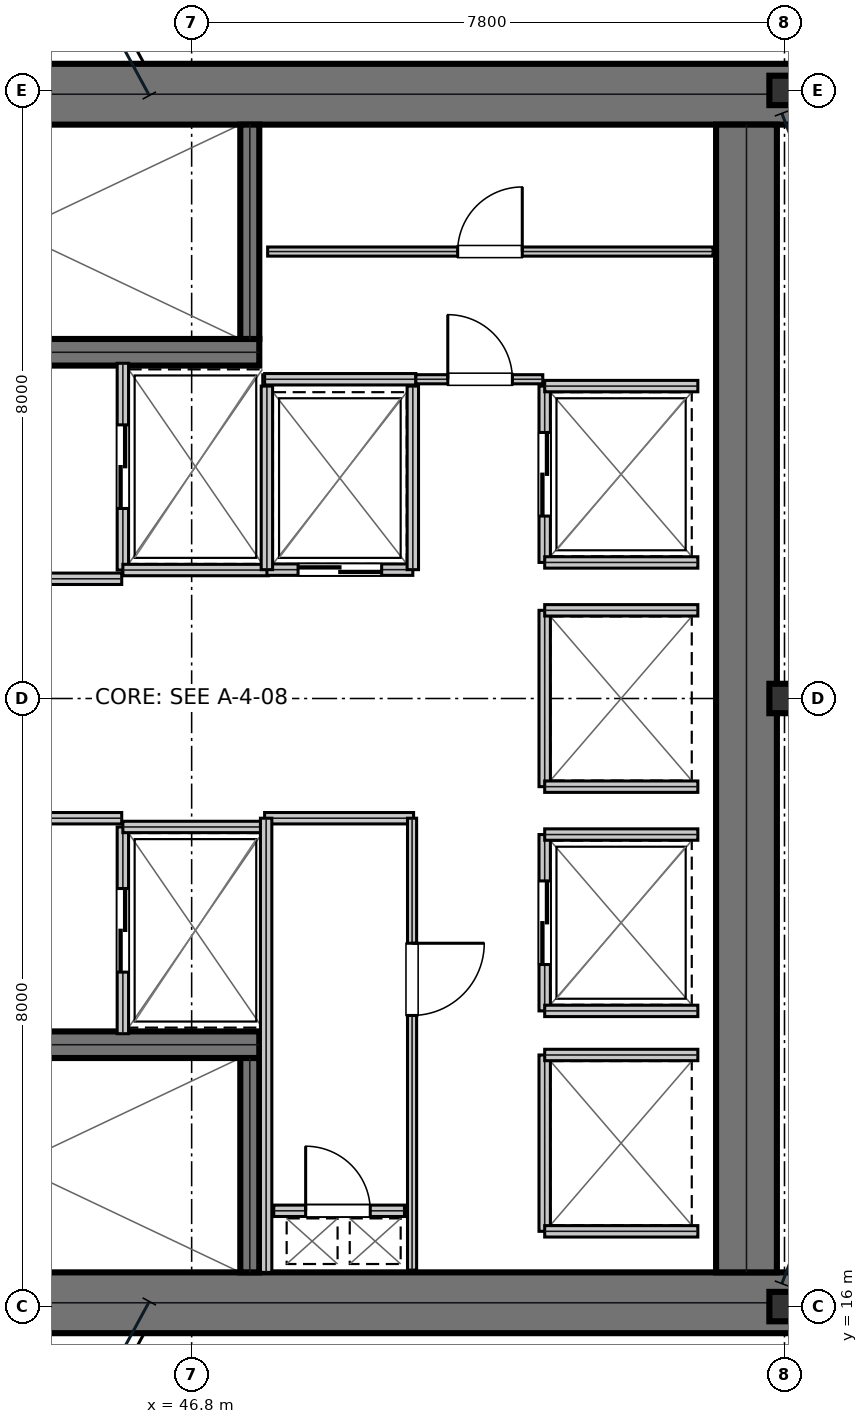
"""IFC4 building model, lengths in metres.
Left out: names, types, materials, properties, quantities, classifications, styles, units other than length and angle.
Written with IfcOpenShell. Run it as: python <this file> out.ifc"""

import sys

from ifc_helpers import new_model, si_unit, direction, frame, frame_2d, origin, origin_2d, place, context, subcontext, project, spatial, rectangle, i_section, extrude, element, fill, save


model = new_model("IFC4")
c1 = context("Model", 3, precision=1e-05, world=origin(), true_north=direction((0.0, 1.0)))
c2 = subcontext(c1, "Body", "Model", "MODEL_VIEW")
j1 = project(units=[si_unit("LENGTHUNIT", "METRE"), si_unit("PLANEANGLEUNIT", "RADIAN")], contexts=[c1])
p1 = place(None, origin())
s1 = spatial("IfcSite", under=j1, at=p1, CompositionType="ELEMENT")
p2 = place(p1, origin())
s2 = spatial("IfcBuilding", under=s1, at=p2, CompositionType="ELEMENT")
p3 = place(p2, frame((0.0, 0.0, 157.35)))
s3 = spatial("IfcBuildingStorey", under=s2, at=p3, CompositionType="ELEMENT", Elevation=157.35)
for number, where, z_axis, x_axis in (
    (1, (38.8, 31.95, 0.0), (0.0, 0.0, 1.0), (1.0, 0.0, 0.0)),
    (2, (38.8, 16.05, 0.0), (0.0, 0.0, 1.0), (1.0, 0.0, 0.0)),
):
    element("IfcWall", number, at=place(p3, frame(where, z_axis=z_axis, x_axis=x_axis)), inside=s3, PredefinedType="SHEAR", context=c2, shape_type="SweptSolid", body=[
        extrude(rectangle(XDim=16.0, YDim=0.8, at=frame_2d((8.0, 0.0))), origin(), (0.0, 0.0, 1.0), 3.81),
    ])
p4 = place(p3, frame((54.1, 16.45, 0.0), z_axis=(0.0, 0.0, 1.0), x_axis=(0.0, 1.0, 0.0)))
e3 = element("IfcWall", 3, at=p4, inside=s3, PredefinedType="SHEAR", context=c2, shape_type="SweptSolid", body=[
    extrude(rectangle(XDim=15.1, YDim=0.8, at=frame_2d((7.55, 0.0))), origin(), (0.0, 0.0, 1.0), 3.81),
])
p5 = place(p3, frame((39.98, 28.555, 0.0), z_axis=(0.0, 0.0, 1.0), x_axis=(1.0, 0.0, 0.0)))
e4 = element("IfcWall", 4, at=p5, inside=s3, PredefinedType="SHEAR", context=c2, shape_type="SweptSolid", body=[
    extrude(rectangle(XDim=7.71, YDim=0.35, at=frame_2d((3.855, 0.0))), origin(), (0.0, 0.0, 1.0), 3.81),
])
p6 = place(p5, frame((0.25, 0.0, 0.0)))
e5 = element("IfcOpeningElement", 5, at=p6, cuts=e4, PredefinedType="OPENING", context=c2, shape_type="SweptSolid", body=[
    extrude(rectangle(XDim=1.1, YDim=2.15, at=frame_2d((0.55, 1.075))), frame((0.0, 0.185, 0.0), z_axis=(0.0, -1.0, 0.0), x_axis=(1.0, 0.0, 0.0)), (0.0, 0.0, 1.0), 0.37),
])
p7 = place(p3, frame((39.98, 19.445, 0.0), z_axis=(0.0, 0.0, 1.0), x_axis=(1.0, 0.0, 0.0)))
e6 = element("IfcWall", 6, at=p7, inside=s3, PredefinedType="SHEAR", context=c2, shape_type="SweptSolid", body=[
    extrude(rectangle(XDim=7.71, YDim=0.35, at=frame_2d((3.855, 0.0))), origin(), (0.0, 0.0, 1.0), 3.81),
])
p8 = place(p7, frame((0.25, 0.0, 0.0)))
e7 = element("IfcOpeningElement", 7, at=p8, cuts=e6, PredefinedType="OPENING", context=c2, shape_type="SweptSolid", body=[
    extrude(rectangle(XDim=1.1, YDim=2.15, at=frame_2d((0.55, 1.075))), frame((0.0, 0.185, 0.0), z_axis=(0.0, -1.0, 0.0), x_axis=(1.0, 0.0, 0.0)), (0.0, 0.0, 1.0), 0.37),
])
for number, where, z_axis, x_axis in (
    (8, (47.565, 28.73, 0.0), (0.0, 0.0, 1.0), (0.0, 1.0, 0.0)),
    (9, (47.565, 16.45, 0.0), (0.0, 0.0, 1.0), (0.0, 1.0, 0.0)),
):
    element("IfcWall", number, at=place(p3, frame(where, z_axis=z_axis, x_axis=x_axis)), inside=s3, PredefinedType="SHEAR", context=c2, shape_type="SweptSolid", body=[
        extrude(rectangle(XDim=2.82, YDim=0.25, at=frame_2d((1.41, 0.0))), origin(), (0.0, 0.0, 1.0), 3.81),
    ])
for number, where, z_axis, x_axis in (
    (10, (54.6, 16.0, 0.0), (0.0, 0.0, 1.0), (1.0, 0.0, 0.0)),
    (11, (54.6, 24.0, 0.0), (0.0, 0.0, 1.0), (1.0, 0.0, 0.0)),
    (12, (54.6, 32.0, 0.0), (0.0, 0.0, 1.0), (1.0, 0.0, 0.0)),
):
    element("IfcColumn", number, at=place(p3, frame(where, z_axis=z_axis, x_axis=x_axis)), inside=s3, PredefinedType="COLUMN", context=c2, shape_type="SweptSolid", body=[
        extrude(i_section(OverallWidth=0.398, OverallDepth=0.387, WebThickness=0.021, FlangeThickness=0.033, at=origin_2d()), origin(), (0.0, 0.0, 1.0), 4.044),
    ])
p9 = place(p3, frame((39.98, 25.575, 0.0), z_axis=(0.0, 0.0, 1.0), x_axis=(1.0, 0.0, 0.0)))
e13 = element("IfcWall", 13, at=p9, inside=s3, PredefinedType="PARTITIONING", context=c2, shape_type="SweptSolid", body=[
    extrude(rectangle(XDim=5.9, YDim=0.15, at=frame_2d((2.95, 0.0))), origin(), (0.0, 0.0, 1.0), 3.81),
])
p10 = place(p9, frame((2.35, 0.0, 0.0)))
e14 = element("IfcOpeningElement", 14, at=p10, cuts=e13, PredefinedType="OPENING", context=c2, shape_type="SweptSolid", body=[
    extrude(rectangle(XDim=1.05, YDim=2.15, at=frame_2d((0.525, 1.075))), frame((0.0, 0.085, 0.0), z_axis=(0.0, -1.0, 0.0), x_axis=(1.0, 0.0, 0.0)), (0.0, 0.0, 1.0), 0.17),
])
p11 = place(p3, frame((39.98, 22.425, 0.0), z_axis=(0.0, 0.0, 1.0), x_axis=(1.0, 0.0, 0.0)))
e15 = element("IfcWall", 15, at=p11, inside=s3, PredefinedType="PARTITIONING", context=c2, shape_type="SweptSolid", body=[
    extrude(rectangle(XDim=5.9, YDim=0.15, at=frame_2d((2.95, 0.0))), origin(), (0.0, 0.0, 1.0), 3.81),
])
p12 = place(p11, frame((2.35, 0.0, 0.0)))
e16 = element("IfcOpeningElement", 16, at=p12, cuts=e15, PredefinedType="OPENING", context=c2, shape_type="SweptSolid", body=[
    extrude(rectangle(XDim=1.05, YDim=2.15, at=frame_2d((0.525, 1.075))), frame((0.0, 0.085, 0.0), z_axis=(0.0, -1.0, 0.0), x_axis=(1.0, 0.0, 0.0)), (0.0, 0.0, 1.0), 0.17),
])
p13 = place(p3, frame((45.895, 25.69, 0.0), z_axis=(0.0, 0.0, 1.0), x_axis=(0.0, 1.0, 0.0)))
e17 = element("IfcWall", 17, at=p13, inside=s3, PredefinedType="PARTITIONING", context=c2, shape_type="SweptSolid", body=[
    extrude(rectangle(XDim=2.72, YDim=0.15, at=frame_2d((1.36, 0.0))), origin(), (0.0, 0.0, 1.0), 3.81),
])
p14 = place(p13, frame((0.81, 0.0, 0.0)))
e18 = element("IfcOpeningElement", 18, at=p14, cuts=e17, PredefinedType="OPENING", context=c2, shape_type="SweptSolid", body=[
    extrude(rectangle(XDim=1.1, YDim=2.15, at=frame_2d((0.55, 1.075))), frame((0.0, 0.085, 0.0), z_axis=(0.0, -1.0, 0.0), x_axis=(1.0, 0.0, 0.0)), (0.0, 0.0, 1.0), 0.17),
])
p15 = place(p3, frame((45.895, 25.69, 0.0), z_axis=(0.0, 0.0, 1.0), x_axis=(1.0, 0.0, 0.0)))
e19 = element("IfcWall", 19, at=p15, inside=s3, PredefinedType="PARTITIONING", context=c2, shape_type="SweptSolid", body=[
    extrude(rectangle(XDim=1.915, YDim=0.15, at=frame_2d((0.958, 0.0))), origin(), (0.0, 0.0, 1.0), 3.81),
])
p16 = place(p3, frame((45.895, 19.59, 0.0), z_axis=(0.0, 0.0, 1.0), x_axis=(0.0, 1.0, 0.0)))
e20 = element("IfcWall", 20, at=p16, inside=s3, PredefinedType="PARTITIONING", context=c2, shape_type="SweptSolid", body=[
    extrude(rectangle(XDim=2.72, YDim=0.15, at=frame_2d((1.36, 0.0))), origin(), (0.0, 0.0, 1.0), 3.81),
])
p17 = place(p16, frame((0.81, 0.0, 0.0)))
e21 = element("IfcOpeningElement", 21, at=p17, cuts=e20, PredefinedType="OPENING", context=c2, shape_type="SweptSolid", body=[
    extrude(rectangle(XDim=1.1, YDim=2.15, at=frame_2d((0.55, 1.075))), frame((0.0, 0.085, 0.0), z_axis=(0.0, -1.0, 0.0), x_axis=(1.0, 0.0, 0.0)), (0.0, 0.0, 1.0), 0.17),
])
p18 = place(p3, frame((45.895, 22.31, 0.0), z_axis=(0.0, 0.0, 1.0), x_axis=(1.0, 0.0, 0.0)))
e22 = element("IfcWall", 22, at=p18, inside=s3, PredefinedType="PARTITIONING", context=c2, shape_type="SweptSolid", body=[
    extrude(rectangle(XDim=1.915, YDim=0.15, at=frame_2d((0.958, 0.0))), origin(), (0.0, 0.0, 1.0), 3.81),
])
p19 = place(p3, frame((47.79, 25.695, 0.0), z_axis=(0.0, 0.0, 1.0), x_axis=(1.0, 0.0, 0.0)))
e23 = element("IfcWall", 23, at=p19, inside=s3, PredefinedType="PARTITIONING", context=c2, shape_type="SweptSolid", body=[
    extrude(rectangle(XDim=1.92, YDim=0.15, at=frame_2d((0.96, 0.0))), origin(), (0.0, 0.0, 1.0), 3.81),
])
p20 = place(p19, frame((0.41, 0.0, 0.0)))
e24 = element("IfcOpeningElement", 24, at=p20, cuts=e23, PredefinedType="OPENING", context=c2, shape_type="SweptSolid", body=[
    extrude(rectangle(XDim=1.1, YDim=2.15, at=frame_2d((0.55, 1.075))), frame((0.0, 0.085, 0.0), z_axis=(0.0, -1.0, 0.0), x_axis=(1.0, 0.0, 0.0)), (0.0, 0.0, 1.0), 0.17),
])
for number, where, z_axis, x_axis in (
    (25, (47.79, 25.695, 0.0), (0.0, 0.0, 1.0), (0.0, 1.0, 0.0)),
    (26, (49.71, 25.695, 0.0), (0.0, 0.0, 1.0), (0.0, 1.0, 0.0)),
):
    element("IfcWall", number, at=place(p3, frame(where, z_axis=z_axis, x_axis=x_axis)), inside=s3, PredefinedType="PARTITIONING", context=c2, shape_type="SweptSolid", body=[
        extrude(rectangle(XDim=2.415, YDim=0.15, at=frame_2d((1.208, 0.0))), origin(), (0.0, 0.0, 1.0), 3.81),
    ])
p21 = place(p3, frame((51.445, 25.79, 0.0), z_axis=(0.0, 0.0, 1.0), x_axis=(0.0, 1.0, 0.0)))
e27 = element("IfcWall", 27, at=p21, inside=s3, PredefinedType="PARTITIONING", context=c2, shape_type="SweptSolid", body=[
    extrude(rectangle(XDim=2.32, YDim=0.15, at=frame_2d((1.16, 0.0))), origin(), (0.0, 0.0, 1.0), 3.81),
])
p22 = place(p21, frame((0.61, 0.0, 0.0)))
e28 = element("IfcOpeningElement", 28, at=p22, cuts=e27, PredefinedType="OPENING", context=c2, shape_type="SweptSolid", body=[
    extrude(rectangle(XDim=1.1, YDim=2.15, at=frame_2d((0.55, 1.075))), frame((0.0, 0.085, 0.0), z_axis=(0.0, -1.0, 0.0), x_axis=(1.0, 0.0, 0.0)), (0.0, 0.0, 1.0), 0.17),
])
for number, where, z_axis, x_axis in (
    (29, (51.445, 25.79, 0.0), (0.0, 0.0, 1.0), (1.0, 0.0, 0.0)),
    (30, (51.445, 28.11, 0.0), (0.0, 0.0, 1.0), (1.0, 0.0, 0.0)),
):
    element("IfcWall", number, at=place(p3, frame(where, z_axis=z_axis, x_axis=x_axis)), inside=s3, PredefinedType="PARTITIONING", context=c2, shape_type="SweptSolid", body=[
        extrude(rectangle(XDim=2.015, YDim=0.15, at=frame_2d((1.007, 0.0))), origin(), (0.0, 0.0, 1.0), 3.81),
    ])
p23 = place(p3, frame((51.445, 19.89, 0.0), z_axis=(0.0, 0.0, 1.0), x_axis=(0.0, 1.0, 0.0)))
e31 = element("IfcWall", 31, at=p23, inside=s3, PredefinedType="PARTITIONING", context=c2, shape_type="SweptSolid", body=[
    extrude(rectangle(XDim=2.32, YDim=0.15, at=frame_2d((1.16, 0.0))), origin(), (0.0, 0.0, 1.0), 3.81),
])
p24 = place(p23, frame((0.61, 0.0, 0.0)))
e32 = element("IfcOpeningElement", 32, at=p24, cuts=e31, PredefinedType="OPENING", context=c2, shape_type="SweptSolid", body=[
    extrude(rectangle(XDim=1.1, YDim=2.15, at=frame_2d((0.55, 1.075))), frame((0.0, 0.085, 0.0), z_axis=(0.0, -1.0, 0.0), x_axis=(1.0, 0.0, 0.0)), (0.0, 0.0, 1.0), 0.17),
])
for number, where, z_axis, x_axis in (
    (33, (51.445, 19.89, 0.0), (0.0, 0.0, 1.0), (1.0, 0.0, 0.0)),
    (34, (51.445, 22.21, 0.0), (0.0, 0.0, 1.0), (1.0, 0.0, 0.0)),
):
    element("IfcWall", number, at=place(p3, frame(where, z_axis=z_axis, x_axis=x_axis)), inside=s3, PredefinedType="PARTITIONING", context=c2, shape_type="SweptSolid", body=[
        extrude(rectangle(XDim=2.015, YDim=0.15, at=frame_2d((1.007, 0.0))), origin(), (0.0, 0.0, 1.0), 3.81),
    ])
p25 = place(p3, frame((51.445, 22.84, 0.0), z_axis=(0.0, 0.0, 1.0), x_axis=(0.0, 1.0, 0.0)))
e35 = element("IfcWall", 35, at=p25, inside=s3, PredefinedType="PARTITIONING", context=c2, shape_type="SweptSolid", body=[
    extrude(rectangle(XDim=2.32, YDim=0.15, at=frame_2d((1.16, 0.0))), origin(), (0.0, 0.0, 1.0), 3.81),
])
for number, where, z_axis, x_axis in (
    (36, (51.445, 22.84, 0.0), (0.0, 0.0, 1.0), (1.0, 0.0, 0.0)),
    (37, (51.445, 25.16, 0.0), (0.0, 0.0, 1.0), (1.0, 0.0, 0.0)),
):
    element("IfcWall", number, at=place(p3, frame(where, z_axis=z_axis, x_axis=x_axis)), inside=s3, PredefinedType="PARTITIONING", context=c2, shape_type="SweptSolid", body=[
        extrude(rectangle(XDim=2.015, YDim=0.15, at=frame_2d((1.007, 0.0))), origin(), (0.0, 0.0, 1.0), 3.81),
    ])
p26 = place(p3, frame((51.445, 16.99, 0.0), z_axis=(0.0, 0.0, 1.0), x_axis=(0.0, 1.0, 0.0)))
e38 = element("IfcWall", 38, at=p26, inside=s3, PredefinedType="PARTITIONING", context=c2, shape_type="SweptSolid", body=[
    extrude(rectangle(XDim=2.32, YDim=0.15, at=frame_2d((1.16, 0.0))), origin(), (0.0, 0.0, 1.0), 3.81),
])
for number, where, z_axis, x_axis in (
    (39, (51.445, 16.99, 0.0), (0.0, 0.0, 1.0), (1.0, 0.0, 0.0)),
    (40, (51.445, 19.31, 0.0), (0.0, 0.0, 1.0), (1.0, 0.0, 0.0)),
):
    element("IfcWall", number, at=place(p3, frame(where, z_axis=z_axis, x_axis=x_axis)), inside=s3, PredefinedType="PARTITIONING", context=c2, shape_type="SweptSolid", body=[
        extrude(rectangle(XDim=2.015, YDim=0.15, at=frame_2d((1.007, 0.0))), origin(), (0.0, 0.0, 1.0), 3.81),
    ])
p27 = place(p3, frame((47.88, 17.26, 0.0), z_axis=(0.0, 0.0, 1.0), x_axis=(1.0, 0.0, 0.0)))
e41 = element("IfcWall", 41, at=p27, inside=s3, PredefinedType="PARTITIONING", context=c2, shape_type="SweptSolid", body=[
    extrude(rectangle(XDim=1.72, YDim=0.15, at=frame_2d((0.86, 0.0))), origin(), (0.0, 0.0, 1.0), 3.81),
])
p28 = place(p27, frame((0.42, 0.0, 0.0)))
e42 = element("IfcOpeningElement", 42, at=p28, cuts=e41, PredefinedType="OPENING", context=c2, shape_type="SweptSolid", body=[
    extrude(rectangle(XDim=0.85, YDim=2.15, at=frame_2d((0.425, 1.075))), frame((0.0, 0.085, 0.0), z_axis=(0.0, -1.0, 0.0), x_axis=(1.0, 0.0, 0.0)), (0.0, 0.0, 1.0), 0.17),
])
p29 = place(p3, frame((47.76, 22.425, 0.0), z_axis=(0.0, 0.0, 1.0), x_axis=(1.0, 0.0, 0.0)))
e43 = element("IfcWall", 43, at=p29, inside=s3, PredefinedType="PARTITIONING", context=c2, shape_type="SweptSolid", body=[
    extrude(rectangle(XDim=1.96, YDim=0.15, at=frame_2d((0.98, 0.0))), origin(), (0.0, 0.0, 1.0), 3.81),
])
p30 = place(p3, frame((47.78, 16.45, 0.0), z_axis=(0.0, 0.0, 1.0), x_axis=(0.0, 1.0, 0.0)))
e44 = element("IfcWall", 44, at=p30, inside=s3, PredefinedType="PARTITIONING", context=c2, shape_type="SweptSolid", body=[
    extrude(rectangle(XDim=5.975, YDim=0.15, at=frame_2d((2.988, 0.0))), origin(), (0.0, 0.0, 1.0), 3.81),
])
p31 = place(p3, frame((49.7, 16.48, 0.0), z_axis=(0.0, 0.0, 1.0), x_axis=(0.0, 1.0, 0.0)))
e45 = element("IfcWall", 45, at=p31, inside=s3, PredefinedType="PARTITIONING", context=c2, shape_type="SweptSolid", body=[
    extrude(rectangle(XDim=5.945, YDim=0.12, at=frame_2d((2.973, 0.0))), origin(), (0.0, 0.0, 1.0), 3.81),
])
p32 = place(p31, frame((3.35, 0.0, 0.0)))
e46 = element("IfcOpeningElement", 46, at=p32, cuts=e45, PredefinedType="OPENING", context=c2, shape_type="SweptSolid", body=[
    extrude(rectangle(XDim=0.95, YDim=2.15, at=frame_2d((0.475, 1.075))), frame((0.0, 0.07, 0.0), z_axis=(0.0, -1.0, 0.0), x_axis=(1.0, 0.0, 0.0)), (0.0, 0.0, 1.0), 0.14),
])
p33 = place(p3, frame((47.76, 28.2, 0.0), z_axis=(0.0, 0.0, 1.0), x_axis=(1.0, 0.0, 0.0)))
e47 = element("IfcWall", 47, at=p33, inside=s3, PredefinedType="PARTITIONING", context=c2, shape_type="SweptSolid", body=[
    extrude(rectangle(XDim=1.99, YDim=0.15, at=frame_2d((0.995, 0.0))), origin(), (0.0, 0.0, 1.0), 3.81),
])
p34 = place(p3, frame((49.75, 28.2, 0.0), z_axis=(0.0, 0.0, 1.0), x_axis=(1.0, 0.0, 0.0)))
e48 = element("IfcWall", 48, at=p34, inside=s3, PredefinedType="PARTITIONING", context=c2, shape_type="SweptSolid", body=[
    extrude(rectangle(XDim=1.67, YDim=0.12, at=frame_2d((0.835, 0.0))), origin(), (0.0, 0.0, 1.0), 3.81),
])
p35 = place(p34, frame((0.42, 0.0, 0.0)))
e49 = element("IfcOpeningElement", 49, at=p35, cuts=e48, PredefinedType="OPENING", context=c2, shape_type="SweptSolid", body=[
    extrude(rectangle(XDim=0.85, YDim=2.15, at=frame_2d((0.425, 1.075))), frame((0.0, 0.07, 0.0), z_axis=(0.0, -1.0, 0.0), x_axis=(1.0, 0.0, 0.0)), (0.0, 0.0, 1.0), 0.14),
])
p36 = place(p3, frame((47.8, 29.88, 0.0), z_axis=(0.0, 0.0, 1.0), x_axis=(1.0, 0.0, 0.0)))
e50 = element("IfcWall", 50, at=p36, inside=s3, PredefinedType="PARTITIONING", context=c2, shape_type="SweptSolid", body=[
    extrude(rectangle(XDim=5.86, YDim=0.12, at=frame_2d((2.93, 0.0))), origin(), (0.0, 0.0, 1.0), 3.81),
])
p37 = place(p36, frame((2.5, 0.0, 0.0)))
e51 = element("IfcOpeningElement", 51, at=p37, cuts=e50, PredefinedType="OPENING", context=c2, shape_type="SweptSolid", body=[
    extrude(rectangle(XDim=0.85, YDim=2.15, at=frame_2d((0.425, 1.075))), frame((0.0, 0.07, 0.0), z_axis=(0.0, -1.0, 0.0), x_axis=(1.0, 0.0, 0.0)), (0.0, 0.0, 1.0), 0.14),
])
p38 = place(p14, frame((1.1, 0.0, 0.0), z_axis=(0.0, 0.0, 1.0), x_axis=(-1.0, 0.0, 0.0)))
e52 = element("IfcDoor", 52, at=p38, inside=s3, OperationType="DOUBLE_DOOR_SLIDING", PredefinedType="DOOR", context=c2, shape_type="SweptSolid", body=[
    extrude(rectangle(XDim=1.1, YDim=2.15, at=frame_2d((0.55, 1.075))), frame((0.0, 0.025, 0.0), z_axis=(0.0, -1.0, 0.0), x_axis=(1.0, 0.0, 0.0)), (0.0, 0.0, 1.0), 0.05),
])
fill(e18, e52)
p39 = place(p17, frame((1.1, 0.0, 0.0), z_axis=(0.0, 0.0, 1.0), x_axis=(-1.0, 0.0, 0.0)))
e53 = element("IfcDoor", 53, at=p39, inside=s3, OperationType="DOUBLE_DOOR_SLIDING", PredefinedType="DOOR", context=c2, shape_type="SweptSolid", body=[
    extrude(rectangle(XDim=1.1, YDim=2.15, at=frame_2d((0.55, 1.075))), frame((0.0, 0.025, 0.0), z_axis=(0.0, -1.0, 0.0), x_axis=(1.0, 0.0, 0.0)), (0.0, 0.0, 1.0), 0.05),
])
fill(e21, e53)
p40 = place(p20, frame((1.1, 0.0, 0.0), z_axis=(0.0, 0.0, 1.0), x_axis=(-1.0, 0.0, 0.0)))
e54 = element("IfcDoor", 54, at=p40, inside=s3, OperationType="DOUBLE_DOOR_SLIDING", PredefinedType="DOOR", context=c2, shape_type="SweptSolid", body=[
    extrude(rectangle(XDim=1.1, YDim=2.15, at=frame_2d((0.55, 1.075))), frame((0.0, 0.025, 0.0), z_axis=(0.0, -1.0, 0.0), x_axis=(1.0, 0.0, 0.0)), (0.0, 0.0, 1.0), 0.05),
])
fill(e24, e54)
p41 = place(p22, frame((1.1, 0.0, 0.0), z_axis=(0.0, 0.0, 1.0), x_axis=(-1.0, 0.0, 0.0)))
e55 = element("IfcDoor", 55, at=p41, inside=s3, OperationType="DOUBLE_DOOR_SLIDING", PredefinedType="DOOR", context=c2, shape_type="SweptSolid", body=[
    extrude(rectangle(XDim=1.1, YDim=2.15, at=frame_2d((0.55, 1.075))), frame((0.0, 0.025, 0.0), z_axis=(0.0, -1.0, 0.0), x_axis=(1.0, 0.0, 0.0)), (0.0, 0.0, 1.0), 0.05),
])
fill(e28, e55)
p42 = place(p24, frame((1.1, 0.0, 0.0), z_axis=(0.0, 0.0, 1.0), x_axis=(-1.0, 0.0, 0.0)))
e56 = element("IfcDoor", 56, at=p42, inside=s3, OperationType="DOUBLE_DOOR_SLIDING", PredefinedType="DOOR", context=c2, shape_type="SweptSolid", body=[
    extrude(rectangle(XDim=1.1, YDim=2.15, at=frame_2d((0.55, 1.075))), frame((0.0, 0.025, 0.0), z_axis=(0.0, -1.0, 0.0), x_axis=(1.0, 0.0, 0.0)), (0.0, 0.0, 1.0), 0.05),
])
fill(e32, e56)
p43 = place(p28, origin())
e57 = element("IfcDoor", 57, at=p43, inside=s3, OperationType="SINGLE_SWING_LEFT", PredefinedType="TRAPDOOR", context=c2, shape_type="SweptSolid", body=[
    extrude(rectangle(XDim=0.85, YDim=2.15, at=frame_2d((0.425, 1.075))), frame((0.0, 0.025, 0.0), z_axis=(0.0, -1.0, 0.0), x_axis=(1.0, 0.0, 0.0)), (0.0, 0.0, 1.0), 0.05),
])
fill(e42, e57)
p44 = place(p32, frame((0.95, 0.0, 0.0), z_axis=(0.0, 0.0, 1.0), x_axis=(-1.0, 0.0, 0.0)))
e58 = element("IfcDoor", 58, at=p44, inside=s3, OperationType="SINGLE_SWING_LEFT", PredefinedType="DOOR", context=c2, shape_type="SweptSolid", body=[
    extrude(rectangle(XDim=0.95, YDim=2.15, at=frame_2d((0.475, 1.075))), frame((0.0, 0.025, 0.0), z_axis=(0.0, -1.0, 0.0), x_axis=(1.0, 0.0, 0.0)), (0.0, 0.0, 1.0), 0.05),
])
fill(e46, e58)
p45 = place(p35, origin())
e59 = element("IfcDoor", 59, at=p45, inside=s3, OperationType="SINGLE_SWING_LEFT", PredefinedType="DOOR", context=c2, shape_type="SweptSolid", body=[
    extrude(rectangle(XDim=0.85, YDim=2.15, at=frame_2d((0.425, 1.075))), frame((0.0, 0.025, 0.0), z_axis=(0.0, -1.0, 0.0), x_axis=(1.0, 0.0, 0.0)), (0.0, 0.0, 1.0), 0.05),
])
fill(e49, e59)
p46 = place(p37, origin())
e60 = element("IfcDoor", 60, at=p46, inside=s3, OperationType="SINGLE_SWING_RIGHT", PredefinedType="DOOR", context=c2, shape_type="SweptSolid", body=[
    extrude(rectangle(XDim=0.85, YDim=2.15, at=frame_2d((0.425, 1.075))), frame((0.0, 0.025, 0.0), z_axis=(0.0, -1.0, 0.0), x_axis=(1.0, 0.0, 0.0)), (0.0, 0.0, 1.0), 0.05),
])
fill(e51, e60)
save(model, sys.argv[1])
